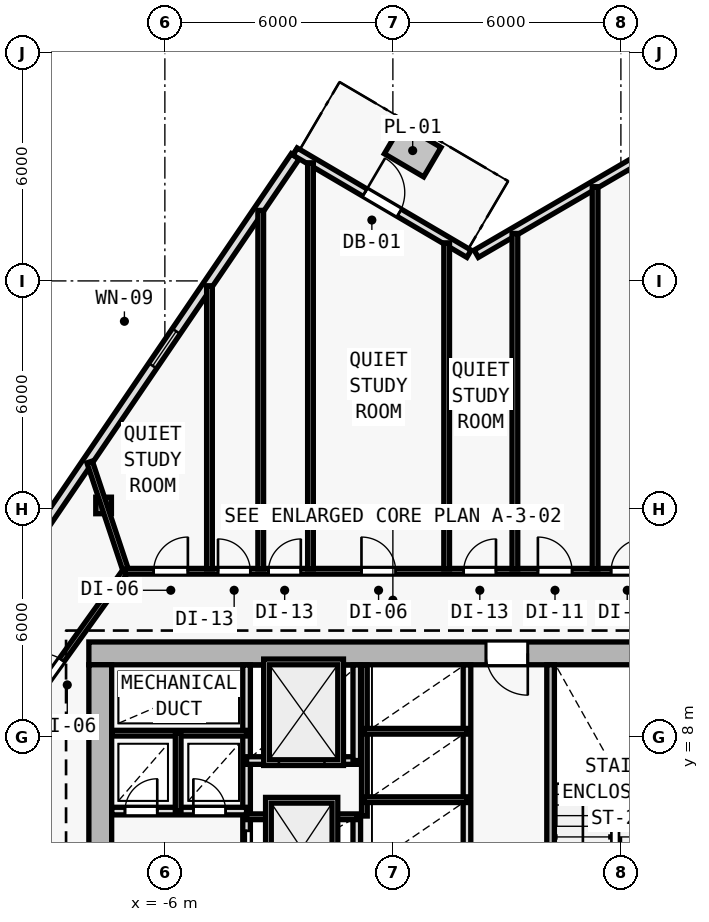
"""IFC4 building model, lengths in metres.
Left out: names, types, materials, properties, quantities, classifications, styles, units other than length and angle.
Written with IfcOpenShell. Run it as: python <this file> out.ifc"""

import sys

from ifc_helpers import new_model, si_unit, direction, frame, frame_2d, origin, origin_2d, place, context, subcontext, project, spatial, rectangle, i_section, extrude, element, fill, save


model = new_model("IFC4")
c1 = context("Model", 3, precision=1e-05, world=origin(), true_north=direction((0.0, 1.0)))
c2 = subcontext(c1, "Body", "Model", "MODEL_VIEW")
j1 = project(units=[si_unit("LENGTHUNIT", "METRE"), si_unit("PLANEANGLEUNIT", "RADIAN")], contexts=[c1])
p1 = place(None, origin())
s1 = spatial("IfcSite", under=j1, at=p1, CompositionType="ELEMENT")
p2 = place(p1, origin())
s2 = spatial("IfcBuilding", under=s1, at=p2, CompositionType="ELEMENT")
p3 = place(p2, frame((0.0, 0.0, 69.6)))
s3 = spatial("IfcBuildingStorey", under=s2, at=p3, CompositionType="ELEMENT", Elevation=69.6)
p4 = place(p3, frame((-7.7, 10.2, 0.0), z_axis=(0.0, 0.0, 1.0), x_axis=(1.0, 0.0, 0.0)))
e1 = element("IfcColumn", 1, at=p4, inside=s3, PredefinedType="COLUMN", context=c2, shape_type="SweptSolid", body=[
    extrude(i_section(OverallWidth=0.416, OverallDepth=0.446, WebThickness=0.025, FlangeThickness=0.04, FilletRadius=0.015, at=origin_2d()), origin(), (0.0, 0.0, 1.0), 3.6),
])
p5 = place(p3, frame((-7.612, 14.092, 0.005), z_axis=(0.008774547672, -0.002516730728, 0.999958335822), x_axis=(0.275705143097, 0.961242255662, 0.0)))
e2 = element("IfcColumn", 2, at=p5, inside=s3, PredefinedType="COLUMN", context=c2, shape_type="SweptSolid", body=[
    extrude(i_section(OverallWidth=0.412, OverallDepth=0.435, WebThickness=0.023, FlangeThickness=0.037, FilletRadius=0.015, at=origin_2d()), origin(), (0.0, 0.0, 1.0), 3.589),
])
p6 = place(p3, frame((6.328, 23.006, 0.0), z_axis=(0.0, 0.0, 1.0), x_axis=(0.511075811474, -0.859535639125, 0.0)))
e3 = element("IfcWall", 3, at=p6, inside=s3, PredefinedType="SOLIDWALL", context=c2, shape_type="SweptSolid", body=[
    extrude(rectangle(XDim=11.646, YDim=0.25, at=frame_2d((5.823, 0.0))), origin(), (0.0, 0.0, 1.0), 3.28),
])
p7 = place(p6, frame((5.073, 0.0, 0.62)))
e4 = element("IfcOpeningElement", 4, at=p7, cuts=e3, PredefinedType="OPENING", context=c2, shape_type="SweptSolid", body=[
    extrude(rectangle(XDim=1.5, YDim=2.0, at=frame_2d((0.75, 1.0))), frame((0.0, 0.135, 0.0), z_axis=(0.0, -1.0, 0.0), x_axis=(1.0, 0.0, 0.0)), (0.0, 0.0, 1.0), 0.27),
])
p8 = place(p3, frame((-9.451, 13.163, 0.0), z_axis=(0.0, 0.0, 1.0), x_axis=(0.562478152622, 0.826812147844, 0.0)))
e5 = element("IfcWall", 5, at=p8, inside=s3, PredefinedType="SOLIDWALL", context=c2, shape_type="SweptSolid", body=[
    extrude(rectangle(XDim=12.232, YDim=0.25, at=frame_2d((6.116, 0.0))), origin(), (0.0, 0.0, 1.0), 3.28),
])
p9 = place(p8, frame((5.566, 0.0, 0.62)))
e6 = element("IfcOpeningElement", 6, at=p9, cuts=e5, PredefinedType="OPENING", context=c2, shape_type="SweptSolid", body=[
    extrude(rectangle(XDim=1.1, YDim=1.8, at=frame_2d((0.55, 0.9))), frame((0.0, 0.135, 0.0), z_axis=(0.0, -1.0, 0.0), x_axis=(1.0, 0.0, 0.0)), (0.0, 0.0, 1.0), 0.27),
])
p10 = place(p3, frame((2.193, 20.713, 0.0), z_axis=(0.0, 0.0, 1.0), x_axis=(0.863964978951, 0.503551899159, 0.0)))
e7 = element("IfcWall", 7, at=p10, inside=s3, PredefinedType="SOLIDWALL", context=c2, shape_type="SweptSolid", body=[
    extrude(rectangle(XDim=4.805, YDim=0.22, at=frame_2d((2.402, 0.0))), origin(), (0.0, 0.0, 1.0), 3.28),
])
p11 = place(p3, frame((-2.572, 23.403, 0.0), z_axis=(0.0, 0.0, 1.0), x_axis=(0.862137551275, -0.506674296449, 0.0)))
e8 = element("IfcWall", 8, at=p11, inside=s3, PredefinedType="SOLIDWALL", context=c2, shape_type="SweptSolid", body=[
    extrude(rectangle(XDim=5.307, YDim=0.22, at=frame_2d((2.654, 0.0))), origin(), (0.0, 0.0, 1.0), 3.28),
])
p12 = place(p11, frame((2.128, 0.0, 0.0)))
e9 = element("IfcOpeningElement", 9, at=p12, cuts=e8, PredefinedType="OPENING", context=c2, shape_type="SweptSolid", body=[
    extrude(rectangle(XDim=1.05, YDim=2.15, at=frame_2d((0.525, 1.075))), frame((0.0, 0.12, 0.0), z_axis=(0.0, -1.0, 0.0), x_axis=(1.0, 0.0, 0.0)), (0.0, 0.0, 1.0), 0.24),
])
p13 = place(p3, frame((8.0, 10.2, 0.0), z_axis=(0.0, 0.0, 1.0), x_axis=(-1.0, 0.0, 0.0)))
e10 = element("IfcWall", 10, at=p13, inside=s3, PredefinedType="SHEAR", context=c2, shape_type="SweptSolid", body=[
    extrude(rectangle(XDim=16.0, YDim=0.6, at=frame_2d((8.0, 0.0))), origin(), (0.0, 0.0, 1.0), 3.28),
])
p14 = place(p13, frame((4.45, 0.0, 0.0)))
e11 = element("IfcOpeningElement", 11, at=p14, cuts=e10, PredefinedType="OPENING", context=c2, shape_type="SweptSolid", body=[
    extrude(rectangle(XDim=1.1, YDim=2.15, at=frame_2d((0.55, 1.075))), frame((0.0, 0.31, 0.0), z_axis=(0.0, -1.0, 0.0), x_axis=(1.0, 0.0, 0.0)), (0.0, 0.0, 1.0), 0.62),
])
p15 = place(p3, frame((-7.7, -9.1, 0.0), z_axis=(0.0, 0.0, 1.0), x_axis=(0.0, 1.0, 0.0)))
e12 = element("IfcWall", 12, at=p15, inside=s3, PredefinedType="SHEAR", context=c2, shape_type="SweptSolid", body=[
    extrude(rectangle(XDim=19.0, YDim=0.6, at=frame_2d((9.5, 0.0))), origin(), (0.0, 0.0, 1.0), 3.28),
])
p16 = place(p15, frame((12.65, 0.0, 0.0)))
e13 = element("IfcOpeningElement", 13, at=p16, cuts=e12, PredefinedType="OPENING", context=c2, shape_type="SweptSolid", body=[
    extrude(rectangle(XDim=1.1, YDim=2.15, at=frame_2d((0.55, 1.075))), frame((0.0, 0.31, 0.0), z_axis=(0.0, -1.0, 0.0), x_axis=(1.0, 0.0, 0.0)), (0.0, 0.0, 1.0), 0.62),
])
p17 = place(p3, frame((-3.85, 1.35, 0.0), z_axis=(0.0, 0.0, 1.0), x_axis=(0.0, 1.0, 0.0)))
e14 = element("IfcWall", 14, at=p17, inside=s3, PredefinedType="SOLIDWALL", context=c2, shape_type="SweptSolid", body=[
    extrude(rectangle(XDim=8.545, YDim=0.2, at=frame_2d((4.272, 0.0))), origin(), (0.0, 0.0, 1.0), 3.28),
])
p18 = place(p17, frame((1.5, 0.0, 0.0)))
e15 = element("IfcOpeningElement", 15, at=p18, cuts=e14, PredefinedType="OPENING", context=c2, shape_type="SweptSolid", body=[
    extrude(rectangle(XDim=1.0, YDim=2.15, at=frame_2d((0.5, 1.075))), frame((0.0, 0.11, 0.0), z_axis=(0.0, -1.0, 0.0), x_axis=(1.0, 0.0, 0.0)), (0.0, 0.0, 1.0), 0.22),
])
p19 = place(p17, frame((3.18, 0.0, 0.0)))
e16 = element("IfcOpeningElement", 16, at=p19, cuts=e14, PredefinedType="OPENING", context=c2, shape_type="SweptSolid", body=[
    extrude(rectangle(XDim=1.0, YDim=2.15, at=frame_2d((0.5, 1.075))), frame((0.0, 0.11, 0.0), z_axis=(0.0, -1.0, 0.0), x_axis=(1.0, 0.0, 0.0)), (0.0, 0.0, 1.0), 0.22),
])
p20 = place(p3, frame((-7.395, 6.05, 0.0), z_axis=(0.0, 0.0, 1.0), x_axis=(1.0, 0.0, 0.0)))
e17 = element("IfcWall", 17, at=p20, inside=s3, PredefinedType="SOLIDWALL", context=c2, shape_type="SweptSolid", body=[
    extrude(rectangle(XDim=3.545, YDim=0.2, at=frame_2d((1.772, 0.0))), origin(), (0.0, 0.0, 1.0), 3.28),
])
p21 = place(p20, frame((0.345, 0.0, 0.0)))
e18 = element("IfcOpeningElement", 18, at=p21, cuts=e17, PredefinedType="OPENING", context=c2, shape_type="SweptSolid", body=[
    extrude(rectangle(XDim=0.85, YDim=2.1, at=frame_2d((0.425, 1.05))), frame((0.0, 0.11, 0.0), z_axis=(0.0, -1.0, 0.0), x_axis=(1.0, 0.0, 0.0)), (0.0, 0.0, 1.0), 0.22),
])
p22 = place(p20, frame((2.145, 0.0, 0.0)))
e19 = element("IfcOpeningElement", 19, at=p22, cuts=e17, PredefinedType="OPENING", context=c2, shape_type="SweptSolid", body=[
    extrude(rectangle(XDim=0.85, YDim=2.1, at=frame_2d((0.425, 1.05))), frame((0.0, 0.11, 0.0), z_axis=(0.0, -1.0, 0.0), x_axis=(1.0, 0.0, 0.0)), (0.0, 0.0, 1.0), 0.22),
])
p23 = place(p3, frame((-7.395, 8.1, 0.0), z_axis=(0.0, 0.0, 1.0), x_axis=(1.0, 0.0, 0.0)))
e20 = element("IfcWall", 20, at=p23, inside=s3, PredefinedType="PARTITIONING", context=c2, shape_type="SweptSolid", body=[
    extrude(rectangle(XDim=3.545, YDim=0.15, at=frame_2d((1.772, 0.0))), origin(), (0.0, 0.0, 1.0), 3.28),
])
p24 = place(p3, frame((-5.65, 6.05, 0.0), z_axis=(0.0, 0.0, 1.0), x_axis=(0.0, 1.0, 0.0)))
e21 = element("IfcWall", 21, at=p24, inside=s3, PredefinedType="PARTITIONING", context=c2, shape_type="SweptSolid", body=[
    extrude(rectangle(XDim=2.05, YDim=0.15, at=frame_2d((1.025, 0.0))), origin(), (0.0, 0.0, 1.0), 3.28),
])
p25 = place(p3, frame((4.15, 2.75, 0.0), z_axis=(0.0, 0.0, 1.0), x_axis=(0.0, 1.0, 0.0)))
e22 = element("IfcWall", 22, at=p25, inside=s3, PredefinedType="SOLIDWALL", context=c2, shape_type="SweptSolid", body=[
    extrude(rectangle(XDim=7.15, YDim=0.2, at=frame_2d((3.575, 0.0))), origin(), (0.0, 0.0, 1.0), 3.28),
])
p26 = place(p25, frame((0.35, 0.0, 0.0)))
e23 = element("IfcOpeningElement", 23, at=p26, cuts=e22, PredefinedType="OPENING", context=c2, shape_type="SweptSolid", body=[
    extrude(rectangle(XDim=1.0, YDim=2.15, at=frame_2d((0.5, 1.075))), frame((0.0, 0.11, 0.0), z_axis=(0.0, -1.0, 0.0), x_axis=(1.0, 0.0, 0.0)), (0.0, 0.0, 1.0), 0.22),
])
p27 = place(p3, frame((-0.95, 2.65, 0.0), z_axis=(0.0, 0.0, 1.0), x_axis=(0.0, 1.0, 0.0)))
e24 = element("IfcWall", 24, at=p27, inside=s3, PredefinedType="SOLIDWALL", context=c2, shape_type="SweptSolid", body=[
    extrude(rectangle(XDim=3.27, YDim=0.2, at=frame_2d((1.635, 0.0))), origin(), (0.0, 0.0, 1.0), 3.28),
])
p28 = place(p3, frame((-3.85, 5.9, 0.0), z_axis=(0.0, 0.0, 1.0), x_axis=(1.0, 0.0, 0.0)))
e25 = element("IfcWall", 25, at=p28, inside=s3, PredefinedType="PARTITIONING", context=c2, shape_type="SweptSolid", body=[
    extrude(rectangle(XDim=2.9, YDim=0.15, at=frame_2d((1.45, 0.0))), origin(), (0.0, 0.0, 1.0), 3.28),
])
p29 = place(p3, frame((-3.85, 7.38, 0.0), z_axis=(0.0, 0.0, 1.0), x_axis=(1.0, 0.0, 0.0)))
e26 = element("IfcWall", 26, at=p29, inside=s3, PredefinedType="SOLIDWALL", context=c2, shape_type="SweptSolid", body=[
    extrude(rectangle(XDim=2.9, YDim=0.2, at=frame_2d((1.45, 0.0))), origin(), (0.0, 0.0, 1.0), 3.28),
])
p30 = place(p29, frame((0.85, 0.0, 0.0)))
e27 = element("IfcOpeningElement", 27, at=p30, cuts=e26, PredefinedType="OPENING", context=c2, shape_type="SweptSolid", body=[
    extrude(rectangle(XDim=1.2, YDim=2.2, at=frame_2d((0.6, 1.1))), frame((0.0, 0.11, 0.0), z_axis=(0.0, -1.0, 0.0), x_axis=(1.0, 0.0, 0.0)), (0.0, 0.0, 1.0), 0.22),
])
p31 = place(p3, frame((-0.95, 7.38, 0.0), z_axis=(0.0, 0.0, 1.0), x_axis=(0.0, 1.0, 0.0)))
e28 = element("IfcWall", 28, at=p31, inside=s3, PredefinedType="SOLIDWALL", context=c2, shape_type="SweptSolid", body=[
    extrude(rectangle(XDim=2.515, YDim=0.2, at=frame_2d((1.258, 0.0))), origin(), (0.0, 0.0, 1.0), 3.28),
])
p32 = place(p3, frame((1.95, 2.65, 0.0), z_axis=(0.0, 0.0, 1.0), x_axis=(0.0, 1.0, 0.0)))
e29 = element("IfcWall", 29, at=p32, inside=s3, PredefinedType="SOLIDWALL", context=c2, shape_type="SweptSolid", body=[
    extrude(rectangle(XDim=7.245, YDim=0.2, at=frame_2d((3.623, 0.0))), origin(), (0.0, 0.0, 1.0), 3.28),
])
p33 = place(p3, frame((-0.75, 5.92, 0.0), z_axis=(0.0, 0.0, 1.0), x_axis=(0.0, 1.0, 0.0)))
e30 = element("IfcWall", 30, at=p33, inside=s3, PredefinedType="PARTITIONING", context=c2, shape_type="SweptSolid", body=[
    extrude(rectangle(XDim=3.975, YDim=0.15, at=frame_2d((1.988, 0.0))), origin(), (0.0, 0.0, 1.0), 3.28),
])
for number, where, z_axis, x_axis in (
    (31, (-0.75, 6.35, 0.0), (0.0, 0.0, 1.0), (1.0, 0.0, 0.0)),
    (32, (-0.75, 8.15, 0.0), (0.0, 0.0, 1.0), (1.0, 0.0, 0.0)),
):
    element("IfcWall", number, at=place(p3, frame(where, z_axis=z_axis, x_axis=x_axis)), inside=s3, PredefinedType="PARTITIONING", context=c2, shape_type="SweptSolid", body=[
        extrude(rectangle(XDim=2.7, YDim=0.15, at=frame_2d((1.35, 0.0))), origin(), (0.0, 0.0, 1.0), 3.28),
    ])
p34 = place(p3, frame((-9.86, 8.426, 0.0), z_axis=(0.0, 0.0, 1.0), x_axis=(0.582449511476, 0.812866881218, 0.0)))
e33 = element("IfcWall", 33, at=p34, inside=s3, PredefinedType="PARTITIONING", context=c2, shape_type="SweptSolid", body=[
    extrude(rectangle(XDim=4.84, YDim=0.15, at=frame_2d((2.42, 0.0))), origin(), (0.0, 0.0, 1.0), 2.655),
])
p35 = place(p34, frame((1.07, 0.0, 0.0)))
e34 = element("IfcOpeningElement", 34, at=p35, cuts=e33, PredefinedType="OPENING", context=c2, shape_type="SweptSolid", body=[
    extrude(rectangle(XDim=0.9, YDim=2.1, at=frame_2d((0.45, 1.05))), frame((0.0, 0.085, 0.0), z_axis=(0.0, -1.0, 0.0), x_axis=(1.0, 0.0, 0.0)), (0.0, 0.0, 1.0), 0.17),
])
p36 = place(p3, frame((-7.041, 12.36, 0.0), z_axis=(0.0, 0.0, 1.0), x_axis=(1.0, 0.0, 0.0)))
e35 = element("IfcWall", 35, at=p36, inside=s3, PredefinedType="PARTITIONING", context=c2, shape_type="SweptSolid", body=[
    extrude(rectangle(XDim=14.082, YDim=0.15, at=frame_2d((7.041, 0.0))), origin(), (0.0, 0.0, 1.0), 3.28),
])
p37 = place(p36, frame((12.783, 0.0, 0.0)))
e36 = element("IfcOpeningElement", 36, at=p37, cuts=e35, PredefinedType="OPENING", context=c2, shape_type="SweptSolid", body=[
    extrude(rectangle(XDim=0.85, YDim=2.1, at=frame_2d((0.425, 1.05))), frame((0.0, 0.085, 0.0), z_axis=(0.0, -1.0, 0.0), x_axis=(1.0, 0.0, 0.0)), (0.0, 0.0, 1.0), 0.17),
])
p38 = place(p36, frame((10.857, 0.0, 0.0)))
e37 = element("IfcOpeningElement", 37, at=p38, cuts=e35, PredefinedType="OPENING", context=c2, shape_type="SweptSolid", body=[
    extrude(rectangle(XDim=0.9, YDim=2.1, at=frame_2d((0.45, 1.05))), frame((0.0, 0.085, 0.0), z_axis=(0.0, -1.0, 0.0), x_axis=(1.0, 0.0, 0.0)), (0.0, 0.0, 1.0), 0.17),
])
p39 = place(p36, frame((8.904, 0.0, 0.0)))
e38 = element("IfcOpeningElement", 38, at=p39, cuts=e35, PredefinedType="OPENING", context=c2, shape_type="SweptSolid", body=[
    extrude(rectangle(XDim=0.85, YDim=2.1, at=frame_2d((0.425, 1.05))), frame((0.0, 0.085, 0.0), z_axis=(0.0, -1.0, 0.0), x_axis=(1.0, 0.0, 0.0)), (0.0, 0.0, 1.0), 0.17),
])
p40 = place(p36, frame((6.215, 0.0, 0.0)))
e39 = element("IfcOpeningElement", 39, at=p40, cuts=e35, PredefinedType="OPENING", context=c2, shape_type="SweptSolid", body=[
    extrude(rectangle(XDim=0.9, YDim=2.1, at=frame_2d((0.45, 1.05))), frame((0.0, 0.085, 0.0), z_axis=(0.0, -1.0, 0.0), x_axis=(1.0, 0.0, 0.0)), (0.0, 0.0, 1.0), 0.17),
])
p41 = place(p36, frame((3.768, 0.0, 0.0)))
e40 = element("IfcOpeningElement", 40, at=p41, cuts=e35, PredefinedType="OPENING", context=c2, shape_type="SweptSolid", body=[
    extrude(rectangle(XDim=0.85, YDim=2.1, at=frame_2d((0.425, 1.05))), frame((0.0, 0.085, 0.0), z_axis=(0.0, -1.0, 0.0), x_axis=(1.0, 0.0, 0.0)), (0.0, 0.0, 1.0), 0.17),
])
p42 = place(p36, frame((2.439, 0.0, 0.0)))
e41 = element("IfcOpeningElement", 41, at=p42, cuts=e35, PredefinedType="OPENING", context=c2, shape_type="SweptSolid", body=[
    extrude(rectangle(XDim=0.85, YDim=2.1, at=frame_2d((0.425, 1.05))), frame((0.0, 0.085, 0.0), z_axis=(0.0, -1.0, 0.0), x_axis=(1.0, 0.0, 0.0)), (0.0, 0.0, 1.0), 0.17),
])
p43 = place(p36, frame((0.747, 0.0, 0.0)))
e42 = element("IfcOpeningElement", 42, at=p43, cuts=e35, PredefinedType="OPENING", context=c2, shape_type="SweptSolid", body=[
    extrude(rectangle(XDim=0.9, YDim=2.1, at=frame_2d((0.45, 1.05))), frame((0.0, 0.085, 0.0), z_axis=(0.0, -1.0, 0.0), x_axis=(1.0, 0.0, 0.0)), (0.0, 0.0, 1.0), 0.17),
])
p44 = place(p3, frame((-7.039, 12.414, 0.0), z_axis=(0.0, 0.0, 1.0), x_axis=(-0.316006200203, 0.948757124576, 0.0)))
e43 = element("IfcWall", 43, at=p44, inside=s3, PredefinedType="PARTITIONING", context=c2, shape_type="SweptSolid", body=[
    extrude(rectangle(XDim=2.975, YDim=0.15, at=frame_2d((1.488, 0.0))), origin(), (0.0, 0.0, 1.0), 2.655),
])
p45 = place(p3, frame((1.415, 12.42, 0.0), z_axis=(0.0, 0.0, 1.0), x_axis=(0.0, 1.0, 0.0)))
e44 = element("IfcWall", 44, at=p45, inside=s3, PredefinedType="PARTITIONING", context=c2, shape_type="SweptSolid", body=[
    extrude(rectangle(XDim=8.581, YDim=0.15, at=frame_2d((4.291, 0.0))), origin(), (0.0, 0.0, 1.0), 2.765),
])
p46 = place(p3, frame((5.321, 12.42, 0.0), z_axis=(0.0, 0.0, 1.0), x_axis=(0.0, 1.0, 0.0)))
e45 = element("IfcWall", 45, at=p46, inside=s3, PredefinedType="PARTITIONING", context=c2, shape_type="SweptSolid", body=[
    extrude(rectangle(XDim=10.059, YDim=0.15, at=frame_2d((5.029, 0.0))), origin(), (0.0, 0.0, 1.0), 2.765),
])
p47 = place(p3, frame((-3.477, 12.42, 0.0), z_axis=(0.0, 0.0, 1.0), x_axis=(0.0, 1.0, 0.0)))
e46 = element("IfcWall", 46, at=p47, inside=s3, PredefinedType="PARTITIONING", context=c2, shape_type="SweptSolid", body=[
    extrude(rectangle(XDim=9.435, YDim=0.15, at=frame_2d((4.718, 0.0))), origin(), (0.0, 0.0, 1.0), 2.765),
])
p48 = place(p3, frame((3.211, 12.42, 0.0), z_axis=(0.0, 0.0, 1.0), x_axis=(0.0, 1.0, 0.0)))
e47 = element("IfcWall", 47, at=p48, inside=s3, PredefinedType="PARTITIONING", context=c2, shape_type="SweptSolid", body=[
    extrude(rectangle(XDim=8.829, YDim=0.15, at=frame_2d((4.414, 0.0))), origin(), (0.0, 0.0, 1.0), 2.765),
])
p49 = place(p3, frame((-2.168, 12.42, 0.0), z_axis=(0.0, 0.0, 1.0), x_axis=(0.0, 1.0, 0.0)))
e48 = element("IfcWall", 48, at=p49, inside=s3, PredefinedType="PARTITIONING", context=c2, shape_type="SweptSolid", body=[
    extrude(rectangle(XDim=10.688, YDim=0.15, at=frame_2d((5.344, 0.0))), origin(), (0.0, 0.0, 1.0), 2.765),
])
p50 = place(p3, frame((-4.826, 12.42, 0.0), z_axis=(0.0, 0.0, 1.0), x_axis=(0.0, 1.0, 0.0)))
e49 = element("IfcWall", 49, at=p50, inside=s3, PredefinedType="PARTITIONING", context=c2, shape_type="SweptSolid", body=[
    extrude(rectangle(XDim=7.452, YDim=0.15, at=frame_2d((3.726, 0.0))), origin(), (0.0, 0.0, 1.0), 2.765),
])
p51 = place(p9, origin())
e50 = element("IfcWindow", 50, at=p51, inside=s3, PartitioningType="SINGLE_PANEL", PredefinedType="WINDOW", context=c2, shape_type="SweptSolid", body=[
    extrude(rectangle(XDim=1.1, YDim=1.8, at=frame_2d((0.55, 0.9))), frame((0.0, 0.03, 0.0), z_axis=(0.0, -1.0, 0.0), x_axis=(1.0, 0.0, 0.0)), (0.0, 0.0, 1.0), 0.06),
])
fill(e6, e50)
p52 = place(p12, origin())
e51 = element("IfcDoor", 51, at=p52, inside=s3, OperationType="SINGLE_SWING_LEFT", PredefinedType="DOOR", context=c2, shape_type="SweptSolid", body=[
    extrude(rectangle(XDim=1.05, YDim=2.15, at=frame_2d((0.525, 1.075))), frame((0.0, 0.025, 0.0), z_axis=(0.0, -1.0, 0.0), x_axis=(1.0, 0.0, 0.0)), (0.0, 0.0, 1.0), 0.05),
])
fill(e9, e51)
p53 = place(p14, origin())
e52 = element("IfcDoor", 52, at=p53, inside=s3, OperationType="SINGLE_SWING_LEFT", PredefinedType="DOOR", context=c2, shape_type="SweptSolid", body=[
    extrude(rectangle(XDim=1.1, YDim=2.15, at=frame_2d((0.55, 1.075))), frame((0.0, 0.025, 0.0), z_axis=(0.0, -1.0, 0.0), x_axis=(1.0, 0.0, 0.0)), (0.0, 0.0, 1.0), 0.05),
])
fill(e11, e52)
p54 = place(p21, origin())
e53 = element("IfcDoor", 53, at=p54, inside=s3, OperationType="SINGLE_SWING_RIGHT", PredefinedType="DOOR", context=c2, shape_type="SweptSolid", body=[
    extrude(rectangle(XDim=0.85, YDim=2.1, at=frame_2d((0.425, 1.05))), frame((0.0, 0.025, 0.0), z_axis=(0.0, -1.0, 0.0), x_axis=(1.0, 0.0, 0.0)), (0.0, 0.0, 1.0), 0.05),
])
fill(e18, e53)
p55 = place(p22, origin())
e54 = element("IfcDoor", 54, at=p55, inside=s3, OperationType="SINGLE_SWING_LEFT", PredefinedType="DOOR", context=c2, shape_type="SweptSolid", body=[
    extrude(rectangle(XDim=0.85, YDim=2.1, at=frame_2d((0.425, 1.05))), frame((0.0, 0.025, 0.0), z_axis=(0.0, -1.0, 0.0), x_axis=(1.0, 0.0, 0.0)), (0.0, 0.0, 1.0), 0.05),
])
fill(e19, e54)
p56 = place(p30, origin())
e55 = element("IfcDoor", 55, at=p56, inside=s3, OperationType="DOUBLE_DOOR_SLIDING", PredefinedType="DOOR", context=c2, shape_type="SweptSolid", body=[
    extrude(rectangle(XDim=1.2, YDim=2.2, at=frame_2d((0.6, 1.1))), frame((0.0, 0.025, 0.0), z_axis=(0.0, -1.0, 0.0), x_axis=(1.0, 0.0, 0.0)), (0.0, 0.0, 1.0), 0.05),
])
fill(e27, e55)
p57 = place(p19, origin())
e56 = element("IfcDoor", 56, at=p57, inside=s3, OperationType="DOUBLE_DOOR_SLIDING", PredefinedType="DOOR", context=c2, shape_type="SweptSolid", body=[
    extrude(rectangle(XDim=1.0, YDim=2.15, at=frame_2d((0.5, 1.075))), frame((0.0, 0.025, 0.0), z_axis=(0.0, -1.0, 0.0), x_axis=(1.0, 0.0, 0.0)), (0.0, 0.0, 1.0), 0.05),
])
fill(e16, e56)
p58 = place(p37, origin())
e57 = element("IfcDoor", 57, at=p58, inside=s3, OperationType="SINGLE_SWING_RIGHT", PredefinedType="DOOR", context=c2, shape_type="SweptSolid", body=[
    extrude(rectangle(XDim=0.85, YDim=2.1, at=frame_2d((0.425, 1.05))), frame((0.0, 0.025, 0.0), z_axis=(0.0, -1.0, 0.0), x_axis=(1.0, 0.0, 0.0)), (0.0, 0.0, 1.0), 0.05),
])
fill(e36, e57)
p59 = place(p38, origin())
e58 = element("IfcDoor", 58, at=p59, inside=s3, OperationType="SINGLE_SWING_LEFT", PredefinedType="DOOR", context=c2, shape_type="SweptSolid", body=[
    extrude(rectangle(XDim=0.9, YDim=2.1, at=frame_2d((0.45, 1.05))), frame((0.0, 0.025, 0.0), z_axis=(0.0, -1.0, 0.0), x_axis=(1.0, 0.0, 0.0)), (0.0, 0.0, 1.0), 0.05),
])
fill(e37, e58)
p60 = place(p39, origin())
e59 = element("IfcDoor", 59, at=p60, inside=s3, OperationType="SINGLE_SWING_RIGHT", PredefinedType="DOOR", context=c2, shape_type="SweptSolid", body=[
    extrude(rectangle(XDim=0.85, YDim=2.1, at=frame_2d((0.425, 1.05))), frame((0.0, 0.025, 0.0), z_axis=(0.0, -1.0, 0.0), x_axis=(1.0, 0.0, 0.0)), (0.0, 0.0, 1.0), 0.05),
])
fill(e38, e59)
p61 = place(p40, origin())
e60 = element("IfcDoor", 60, at=p61, inside=s3, OperationType="SINGLE_SWING_LEFT", PredefinedType="DOOR", context=c2, shape_type="SweptSolid", body=[
    extrude(rectangle(XDim=0.9, YDim=2.1, at=frame_2d((0.45, 1.05))), frame((0.0, 0.025, 0.0), z_axis=(0.0, -1.0, 0.0), x_axis=(1.0, 0.0, 0.0)), (0.0, 0.0, 1.0), 0.05),
])
fill(e39, e60)
p62 = place(p41, origin())
e61 = element("IfcDoor", 61, at=p62, inside=s3, OperationType="SINGLE_SWING_RIGHT", PredefinedType="DOOR", context=c2, shape_type="SweptSolid", body=[
    extrude(rectangle(XDim=0.85, YDim=2.1, at=frame_2d((0.425, 1.05))), frame((0.0, 0.025, 0.0), z_axis=(0.0, -1.0, 0.0), x_axis=(1.0, 0.0, 0.0)), (0.0, 0.0, 1.0), 0.05),
])
fill(e40, e61)
p63 = place(p42, origin())
e62 = element("IfcDoor", 62, at=p63, inside=s3, OperationType="SINGLE_SWING_LEFT", PredefinedType="DOOR", context=c2, shape_type="SweptSolid", body=[
    extrude(rectangle(XDim=0.85, YDim=2.1, at=frame_2d((0.425, 1.05))), frame((0.0, 0.025, 0.0), z_axis=(0.0, -1.0, 0.0), x_axis=(1.0, 0.0, 0.0)), (0.0, 0.0, 1.0), 0.05),
])
fill(e41, e62)
p64 = place(p43, origin())
e63 = element("IfcDoor", 63, at=p64, inside=s3, OperationType="SINGLE_SWING_RIGHT", PredefinedType="DOOR", context=c2, shape_type="SweptSolid", body=[
    extrude(rectangle(XDim=0.9, YDim=2.1, at=frame_2d((0.45, 1.05))), frame((0.0, 0.025, 0.0), z_axis=(0.0, -1.0, 0.0), x_axis=(1.0, 0.0, 0.0)), (0.0, 0.0, 1.0), 0.05),
])
fill(e42, e63)
p65 = place(p35, origin())
e64 = element("IfcDoor", 64, at=p65, inside=s3, OperationType="SINGLE_SWING_LEFT", PredefinedType="DOOR", context=c2, shape_type="SweptSolid", body=[
    extrude(rectangle(XDim=0.9, YDim=2.1, at=frame_2d((0.45, 1.05))), frame((0.0, 0.025, 0.0), z_axis=(0.0, -1.0, 0.0), x_axis=(1.0, 0.0, 0.0)), (0.0, 0.0, 1.0), 0.05),
])
fill(e34, e64)
save(model, sys.argv[1])
